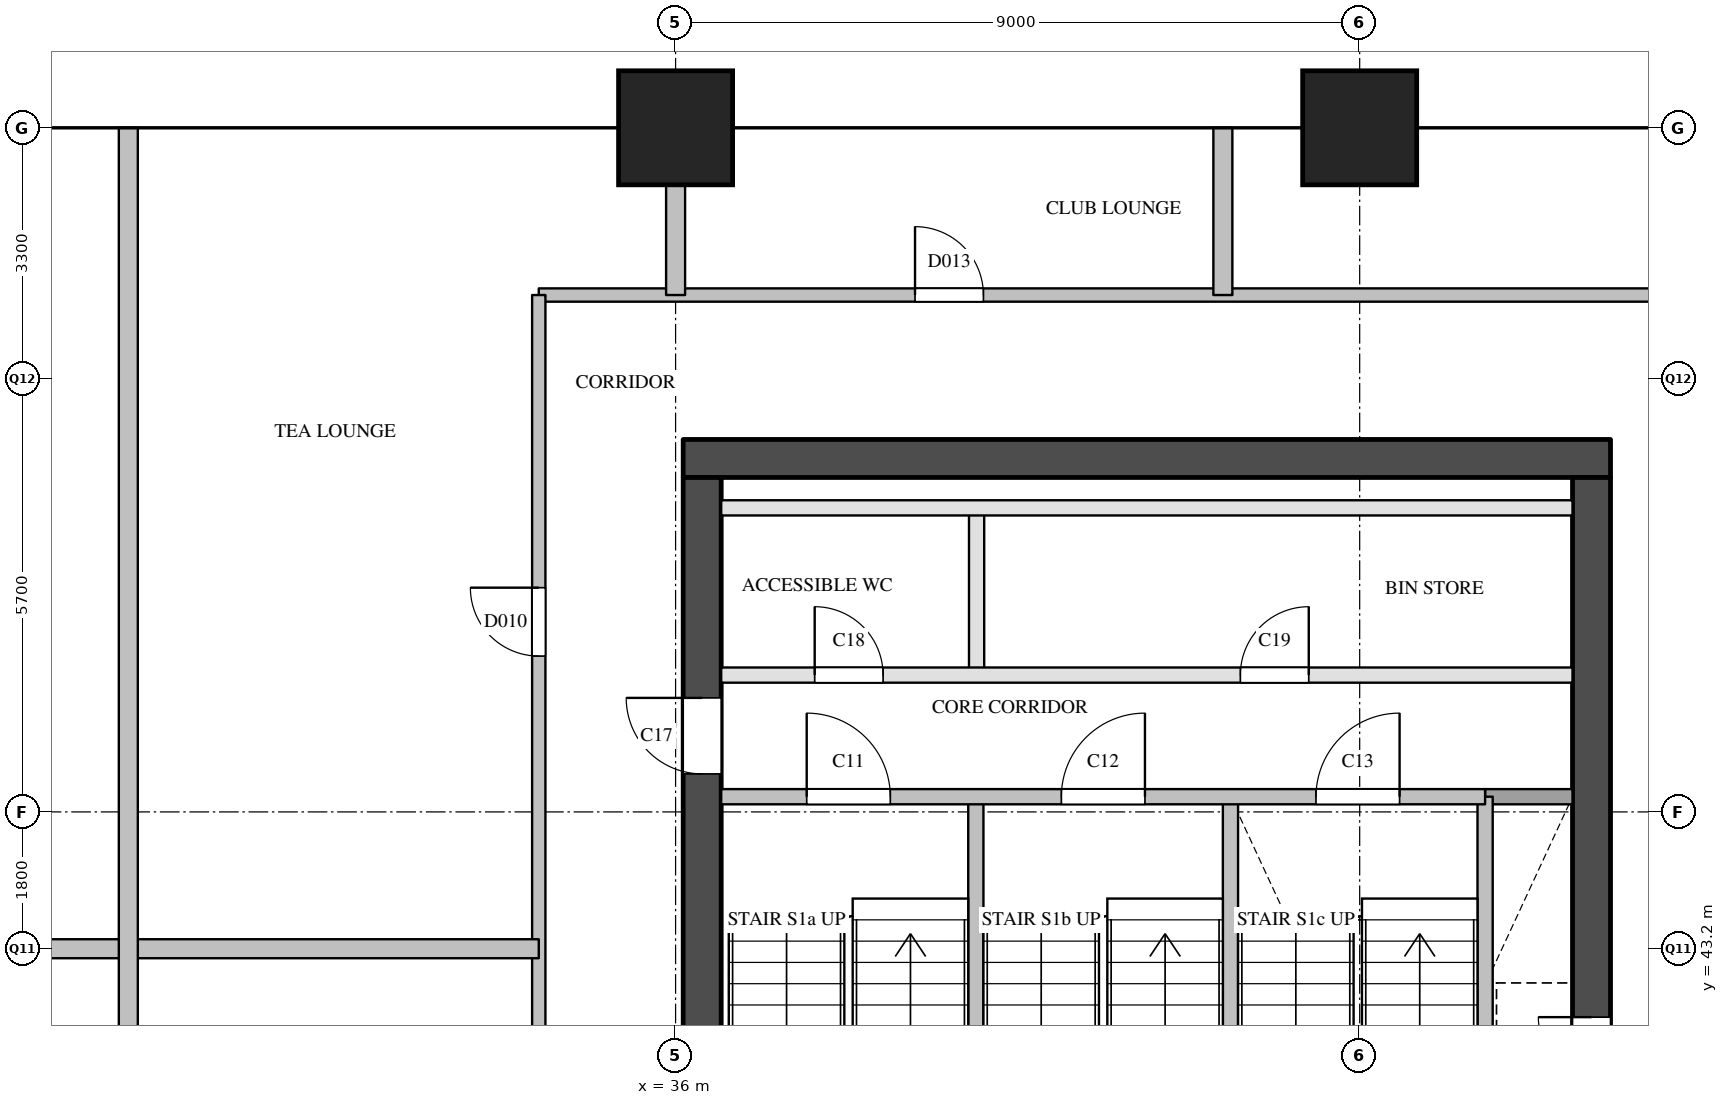
"""IFC4 building model, lengths in metres.
Left out: names, types, materials, properties, quantities, classifications, styles, units other than length and angle.
Written with IfcOpenShell. Run it as: python <this file> out.ifc"""

import sys

from ifc_helpers import new_model, si_unit, direction, frame, frame_2d, origin, origin_2d, place, context, subcontext, project, spatial, rectangle, extrude, element, fill, save


model = new_model("IFC4")
c1 = context("Model", 3, precision=1e-05, world=origin(), true_north=direction((0.0, 1.0)))
c2 = subcontext(c1, "Body", "Model", "MODEL_VIEW")
j1 = project(units=[si_unit("LENGTHUNIT", "METRE"), si_unit("PLANEANGLEUNIT", "RADIAN")], contexts=[c1])
p1 = place(None, origin())
s1 = spatial("IfcSite", under=j1, at=p1, CompositionType="ELEMENT")
p2 = place(p1, origin())
s2 = spatial("IfcBuilding", under=s1, at=p2, CompositionType="ELEMENT")
p3 = place(p2, frame((0.0, 0.0, 185.6)))
s3 = spatial("IfcBuildingStorey", under=s2, at=p3, CompositionType="ELEMENT", Elevation=185.6)
for number, where, z_axis, x_axis in (
    (1, (36.0, 54.0, 0.0), (0.0, 0.0, 1.0), (1.0, 0.0, 0.0)),
    (2, (45.0, 54.0, 0.0), (0.0, 0.0, 1.0), (1.0, 0.0, 0.0)),
):
    element("IfcColumn", number, at=place(p3, frame(where, z_axis=z_axis, x_axis=x_axis)), inside=s3, PredefinedType="COLUMN", context=c2, shape_type="SweptSolid", body=[
        extrude(rectangle(XDim=1.5, YDim=1.5, at=origin_2d()), origin(), (0.0, 0.0, 1.0), 3.9),
    ])
p4 = place(p3, frame((36.1, 49.65, 0.0), z_axis=(0.0, 0.0, 1.0), x_axis=(1.0, 0.0, 0.0)))
e3 = element("IfcWall", 3, at=p4, inside=s3, PredefinedType="SHEAR", context=c2, shape_type="SweptSolid", body=[
    extrude(rectangle(XDim=12.2, YDim=0.5, at=frame_2d((6.1, 0.0))), origin(), (0.0, 0.0, 1.0), 3.6),
])
p5 = place(p3, frame((36.35, 29.1, 0.0), z_axis=(0.0, 0.0, 1.0), x_axis=(0.0, 1.0, 0.0)))
e4 = element("IfcWall", 4, at=p5, inside=s3, PredefinedType="SHEAR", context=c2, shape_type="SweptSolid", body=[
    extrude(rectangle(XDim=20.3, YDim=0.5, at=frame_2d((10.15, 0.0))), origin(), (0.0, 0.0, 1.0), 3.6),
])
p6 = place(p5, frame((3.6, 0.0, 0.0)))
e5 = element("IfcOpeningElement", 5, at=p6, cuts=e4, PredefinedType="OPENING", context=c2, shape_type="SweptSolid", body=[
    extrude(rectangle(XDim=1.8, YDim=2.1, at=frame_2d((0.9, 1.05))), frame((0.0, 0.26, 0.0), z_axis=(0.0, -1.0, 0.0), x_axis=(1.0, 0.0, 0.0)), (0.0, 0.0, 1.0), 0.52),
])
p7 = place(p5, frame((16.4, 0.0, 0.0)))
e6 = element("IfcOpeningElement", 6, at=p7, cuts=e4, PredefinedType="OPENING", context=c2, shape_type="SweptSolid", body=[
    extrude(rectangle(XDim=1.0, YDim=2.1, at=frame_2d((0.5, 1.05))), frame((0.0, 0.26, 0.0), z_axis=(0.0, -1.0, 0.0), x_axis=(1.0, 0.0, 0.0)), (0.0, 0.0, 1.0), 0.52),
])
p8 = place(p3, frame((48.05, 29.1, 0.0), z_axis=(0.0, 0.0, 1.0), x_axis=(0.0, 1.0, 0.0)))
e7 = element("IfcWall", 7, at=p8, inside=s3, PredefinedType="SHEAR", context=c2, shape_type="SweptSolid", body=[
    extrude(rectangle(XDim=20.3, YDim=0.5, at=frame_2d((10.15, 0.0))), origin(), (0.0, 0.0, 1.0), 3.6),
])
p9 = place(p8, frame((12.5, 0.0, 0.0)))
e8 = element("IfcOpeningElement", 8, at=p9, cuts=e7, PredefinedType="OPENING", context=c2, shape_type="SweptSolid", body=[
    extrude(rectangle(XDim=0.7, YDim=2.1, at=frame_2d((0.35, 1.05))), frame((0.0, 0.26, 0.0), z_axis=(0.0, -1.0, 0.0), x_axis=(1.0, 0.0, 0.0)), (0.0, 0.0, 1.0), 0.52),
])
p10 = place(p8, frame((3.9, 0.0, 0.0)))
e9 = element("IfcOpeningElement", 9, at=p10, cuts=e7, PredefinedType="OPENING", context=c2, shape_type="SweptSolid", body=[
    extrude(rectangle(XDim=1.8, YDim=2.1, at=frame_2d((0.9, 1.05))), frame((0.0, 0.26, 0.0), z_axis=(0.0, -1.0, 0.0), x_axis=(1.0, 0.0, 0.0)), (0.0, 0.0, 1.0), 0.52),
])
p11 = place(p3, frame((39.95, 40.78, 0.0), z_axis=(0.0, 0.0, 1.0), x_axis=(0.0, 1.0, 0.0)))
e10 = element("IfcWall", 10, at=p11, inside=s3, PredefinedType="SOLIDWALL", context=c2, shape_type="SweptSolid", body=[
    extrude(rectangle(XDim=4.42, YDim=0.2, at=frame_2d((2.21, 0.0))), origin(), (0.0, 0.0, 1.0), 3.6),
])
p12 = place(p3, frame((39.96, 46.8, 0.0), z_axis=(0.0, 0.0, 1.0), x_axis=(0.0, 1.0, 0.0)))
e11 = element("IfcWall", 11, at=p12, inside=s3, PredefinedType="PARTITIONING", context=c2, shape_type="SweptSolid", body=[
    extrude(rectangle(XDim=2.2, YDim=0.2, at=frame_2d((1.1, 0.0))), origin(), (0.0, 0.0, 1.0), 3.6),
])
for number, where, z_axis, x_axis in (
    (12, (43.3, 40.78, 0.0), (0.0, 0.0, 1.0), (0.0, 1.0, 0.0)),
    (13, (46.65, 40.78, 0.0), (0.0, 0.0, 1.0), (0.0, 1.0, 0.0)),
):
    element("IfcWall", number, at=place(p3, frame(where, z_axis=z_axis, x_axis=x_axis)), inside=s3, PredefinedType="SOLIDWALL", context=c2, shape_type="SweptSolid", body=[
        extrude(rectangle(XDim=4.42, YDim=0.2, at=frame_2d((2.21, 0.0))), origin(), (0.0, 0.0, 1.0), 3.6),
    ])
p13 = place(p3, frame((46.65, 45.2, 0.0), z_axis=(0.0, 0.0, 1.0), x_axis=(1.0, 0.0, 0.0)))
e14 = element("IfcWall", 14, at=p13, inside=s3, PredefinedType="SOLIDWALL", context=c2, shape_type="SweptSolid", body=[
    extrude(rectangle(XDim=1.15, YDim=0.2, at=frame_2d((0.575, 0.0))), origin(), (0.0, 0.0, 1.0), 3.6),
])
p14 = place(p3, frame((36.6, 45.2, 0.0), z_axis=(0.0, 0.0, 1.0), x_axis=(1.0, 0.0, 0.0)))
e15 = element("IfcWall", 15, at=p14, inside=s3, PredefinedType="SOLIDWALL", context=c2, shape_type="SweptSolid", body=[
    extrude(rectangle(XDim=10.05, YDim=0.2, at=frame_2d((5.025, 0.0))), origin(), (0.0, 0.0, 1.0), 3.6),
])
p15 = place(p14, frame((1.125, 0.0, 0.0)))
e16 = element("IfcOpeningElement", 16, at=p15, cuts=e15, PredefinedType="OPENING", context=c2, shape_type="SweptSolid", body=[
    extrude(rectangle(XDim=1.1, YDim=2.1, at=frame_2d((0.55, 1.05))), frame((0.0, 0.11, 0.0), z_axis=(0.0, -1.0, 0.0), x_axis=(1.0, 0.0, 0.0)), (0.0, 0.0, 1.0), 0.22),
])
p16 = place(p14, frame((4.475, 0.0, 0.0)))
e17 = element("IfcOpeningElement", 17, at=p16, cuts=e15, PredefinedType="OPENING", context=c2, shape_type="SweptSolid", body=[
    extrude(rectangle(XDim=1.1, YDim=2.1, at=frame_2d((0.55, 1.05))), frame((0.0, 0.11, 0.0), z_axis=(0.0, -1.0, 0.0), x_axis=(1.0, 0.0, 0.0)), (0.0, 0.0, 1.0), 0.22),
])
p17 = place(p14, frame((7.825, 0.0, 0.0)))
e18 = element("IfcOpeningElement", 18, at=p17, cuts=e15, PredefinedType="OPENING", context=c2, shape_type="SweptSolid", body=[
    extrude(rectangle(XDim=1.1, YDim=2.1, at=frame_2d((0.55, 1.05))), frame((0.0, 0.11, 0.0), z_axis=(0.0, -1.0, 0.0), x_axis=(1.0, 0.0, 0.0)), (0.0, 0.0, 1.0), 0.22),
])
p18 = place(p3, frame((36.6, 46.8, 0.0), z_axis=(0.0, 0.0, 1.0), x_axis=(1.0, 0.0, 0.0)))
e19 = element("IfcWall", 19, at=p18, inside=s3, PredefinedType="PARTITIONING", context=c2, shape_type="SweptSolid", body=[
    extrude(rectangle(XDim=11.2, YDim=0.2, at=frame_2d((5.6, 0.0))), origin(), (0.0, 0.0, 1.0), 3.6),
])
p19 = place(p18, frame((1.23, 0.0, 0.0)))
e20 = element("IfcOpeningElement", 20, at=p19, cuts=e19, PredefinedType="OPENING", context=c2, shape_type="SweptSolid", body=[
    extrude(rectangle(XDim=0.9, YDim=2.1, at=frame_2d((0.45, 1.05))), frame((0.0, 0.11, 0.0), z_axis=(0.0, -1.0, 0.0), x_axis=(1.0, 0.0, 0.0)), (0.0, 0.0, 1.0), 0.22),
])
p20 = place(p18, frame((6.83, 0.0, 0.0)))
e21 = element("IfcOpeningElement", 21, at=p20, cuts=e19, PredefinedType="OPENING", context=c2, shape_type="SweptSolid", body=[
    extrude(rectangle(XDim=0.9, YDim=2.1, at=frame_2d((0.45, 1.05))), frame((0.0, 0.11, 0.0), z_axis=(0.0, -1.0, 0.0), x_axis=(1.0, 0.0, 0.0)), (0.0, 0.0, 1.0), 0.22),
])
p21 = place(p3, frame((36.6, 49.0, 0.0), z_axis=(0.0, 0.0, 1.0), x_axis=(1.0, 0.0, 0.0)))
e22 = element("IfcWall", 22, at=p21, inside=s3, PredefinedType="PARTITIONING", context=c2, shape_type="SweptSolid", body=[
    extrude(rectangle(XDim=11.2, YDim=0.2, at=frame_2d((5.6, 0.0))), origin(), (0.0, 0.0, 1.0), 3.6),
])
p22 = place(p3, frame((34.2, 51.8, 0.0), z_axis=(0.0, 0.0, 1.0), x_axis=(1.0, 0.0, 0.0)))
e23 = element("IfcWall", 23, at=p22, inside=s3, PredefinedType="PARTITIONING", context=c2, shape_type="SweptSolid", body=[
    extrude(rectangle(XDim=16.0, YDim=0.175, at=frame_2d((8.0, 0.0))), origin(), (0.0, 0.0, 1.0), 3.6),
])
p23 = place(p22, frame((4.95, 0.0, 0.0)))
e24 = element("IfcOpeningElement", 24, at=p23, cuts=e23, PredefinedType="OPENING", context=c2, shape_type="SweptSolid", body=[
    extrude(rectangle(XDim=0.9, YDim=2.1, at=frame_2d((0.45, 1.05))), frame((0.0, 0.097, 0.0), z_axis=(0.0, -1.0, 0.0), x_axis=(1.0, 0.0, 0.0)), (0.0, 0.0, 1.0), 0.195),
])
p24 = place(p3, frame((34.2, 28.5, 0.0), z_axis=(0.0, 0.0, 1.0), x_axis=(0.0, 1.0, 0.0)))
e25 = element("IfcWall", 25, at=p24, inside=s3, PredefinedType="PARTITIONING", context=c2, shape_type="SweptSolid", body=[
    extrude(rectangle(XDim=23.3, YDim=0.175, at=frame_2d((11.65, 0.0))), origin(), (0.0, 0.0, 1.0), 3.6),
])
p25 = place(p24, frame((3.3, 0.0, 0.0)))
e26 = element("IfcOpeningElement", 26, at=p25, cuts=e25, PredefinedType="OPENING", context=c2, shape_type="SweptSolid", body=[
    extrude(rectangle(XDim=0.9, YDim=2.1, at=frame_2d((0.45, 1.05))), frame((0.0, 0.097, 0.0), z_axis=(0.0, -1.0, 0.0), x_axis=(1.0, 0.0, 0.0)), (0.0, 0.0, 1.0), 0.195),
])
p26 = place(p24, frame((10.6, 0.0, 0.0)))
e27 = element("IfcOpeningElement", 27, at=p26, cuts=e25, PredefinedType="OPENING", context=c2, shape_type="SweptSolid", body=[
    extrude(rectangle(XDim=1.0, YDim=2.1, at=frame_2d((0.5, 1.05))), frame((0.0, 0.097, 0.0), z_axis=(0.0, -1.0, 0.0), x_axis=(1.0, 0.0, 0.0)), (0.0, 0.0, 1.0), 0.195),
])
p27 = place(p24, frame((18.55, 0.0, 0.0)))
e28 = element("IfcOpeningElement", 28, at=p27, cuts=e25, PredefinedType="OPENING", context=c2, shape_type="SweptSolid", body=[
    extrude(rectangle(XDim=0.9, YDim=2.1, at=frame_2d((0.45, 1.05))), frame((0.0, 0.097, 0.0), z_axis=(0.0, -1.0, 0.0), x_axis=(1.0, 0.0, 0.0)), (0.0, 0.0, 1.0), 0.195),
])
p28 = place(p3, frame((19.8, 43.2, 0.0), z_axis=(0.0, 0.0, 1.0), x_axis=(1.0, 0.0, 0.0)))
e29 = element("IfcWall", 29, at=p28, inside=s3, PredefinedType="PARTITIONING", context=c2, shape_type="SweptSolid", body=[
    extrude(rectangle(XDim=14.4, YDim=0.25, at=frame_2d((7.2, 0.0))), origin(), (0.0, 0.0, 1.0), 2.6),
])
p29 = place(p3, frame((28.8, 36.0, 0.0), z_axis=(0.0, 0.0, 1.0), x_axis=(0.0, 1.0, 0.0)))
e30 = element("IfcWall", 30, at=p29, inside=s3, PredefinedType="PARTITIONING", context=c2, shape_type="SweptSolid", body=[
    extrude(rectangle(XDim=18.0, YDim=0.25, at=frame_2d((9.0, 0.0))), origin(), (0.0, 0.0, 1.0), 2.6),
])
p30 = place(p3, frame((36.0, 51.8, 0.0), z_axis=(0.0, 0.0, 1.0), x_axis=(0.0, 1.0, 0.0)))
e31 = element("IfcWall", 31, at=p30, inside=s3, PredefinedType="PARTITIONING", context=c2, shape_type="SweptSolid", body=[
    extrude(rectangle(XDim=2.2, YDim=0.25, at=frame_2d((1.1, 0.0))), origin(), (0.0, 0.0, 1.0), 3.6),
])
p31 = place(p3, frame((43.2, 51.8, 0.0), z_axis=(0.0, 0.0, 1.0), x_axis=(0.0, 1.0, 0.0)))
e32 = element("IfcWall", 32, at=p31, inside=s3, PredefinedType="PARTITIONING", context=c2, shape_type="SweptSolid", body=[
    extrude(rectangle(XDim=2.2, YDim=0.25, at=frame_2d((1.1, 0.0))), origin(), (0.0, 0.0, 1.0), 2.6),
])
p32 = place(p15, origin())
e33 = element("IfcDoor", 33, at=p32, inside=s3, OperationType="SINGLE_SWING_LEFT", PredefinedType="DOOR", context=c2, shape_type="SweptSolid", body=[
    extrude(rectangle(XDim=1.1, YDim=2.1, at=frame_2d((0.55, 1.05))), frame((0.0, 0.025, 0.0), z_axis=(0.0, -1.0, 0.0), x_axis=(1.0, 0.0, 0.0)), (0.0, 0.0, 1.0), 0.05),
])
fill(e16, e33)
p33 = place(p16, origin())
e34 = element("IfcDoor", 34, at=p33, inside=s3, OperationType="SINGLE_SWING_RIGHT", PredefinedType="DOOR", context=c2, shape_type="SweptSolid", body=[
    extrude(rectangle(XDim=1.1, YDim=2.1, at=frame_2d((0.55, 1.05))), frame((0.0, 0.025, 0.0), z_axis=(0.0, -1.0, 0.0), x_axis=(1.0, 0.0, 0.0)), (0.0, 0.0, 1.0), 0.05),
])
fill(e17, e34)
p34 = place(p17, origin())
e35 = element("IfcDoor", 35, at=p34, inside=s3, OperationType="SINGLE_SWING_RIGHT", PredefinedType="DOOR", context=c2, shape_type="SweptSolid", body=[
    extrude(rectangle(XDim=1.1, YDim=2.1, at=frame_2d((0.55, 1.05))), frame((0.0, 0.025, 0.0), z_axis=(0.0, -1.0, 0.0), x_axis=(1.0, 0.0, 0.0)), (0.0, 0.0, 1.0), 0.05),
])
fill(e18, e35)
p35 = place(p9, origin())
e36 = element("IfcDoor", 36, at=p35, inside=s3, OperationType="SINGLE_SWING_RIGHT", PredefinedType="DOOR", context=c2, shape_type="SweptSolid", body=[
    extrude(rectangle(XDim=0.7, YDim=2.1, at=frame_2d((0.35, 1.05))), frame((0.0, 0.025, 0.0), z_axis=(0.0, -1.0, 0.0), x_axis=(1.0, 0.0, 0.0)), (0.0, 0.0, 1.0), 0.05),
])
fill(e8, e36)
p36 = place(p7, origin())
e37 = element("IfcDoor", 37, at=p36, inside=s3, OperationType="SINGLE_SWING_RIGHT", PredefinedType="DOOR", context=c2, shape_type="SweptSolid", body=[
    extrude(rectangle(XDim=1.0, YDim=2.1, at=frame_2d((0.5, 1.05))), frame((0.0, 0.025, 0.0), z_axis=(0.0, -1.0, 0.0), x_axis=(1.0, 0.0, 0.0)), (0.0, 0.0, 1.0), 0.05),
])
fill(e6, e37)
p37 = place(p19, origin())
e38 = element("IfcDoor", 38, at=p37, inside=s3, OperationType="SINGLE_SWING_LEFT", PredefinedType="DOOR", context=c2, shape_type="SweptSolid", body=[
    extrude(rectangle(XDim=0.9, YDim=2.1, at=frame_2d((0.45, 1.05))), frame((0.0, 0.025, 0.0), z_axis=(0.0, -1.0, 0.0), x_axis=(1.0, 0.0, 0.0)), (0.0, 0.0, 1.0), 0.05),
])
fill(e20, e38)
p38 = place(p20, origin())
e39 = element("IfcDoor", 39, at=p38, inside=s3, OperationType="SINGLE_SWING_RIGHT", PredefinedType="DOOR", context=c2, shape_type="SweptSolid", body=[
    extrude(rectangle(XDim=0.9, YDim=2.1, at=frame_2d((0.45, 1.05))), frame((0.0, 0.025, 0.0), z_axis=(0.0, -1.0, 0.0), x_axis=(1.0, 0.0, 0.0)), (0.0, 0.0, 1.0), 0.05),
])
fill(e21, e39)
p39 = place(p27, origin())
e40 = element("IfcDoor", 40, at=p39, inside=s3, OperationType="SINGLE_SWING_RIGHT", PredefinedType="DOOR", context=c2, shape_type="SweptSolid", body=[
    extrude(rectangle(XDim=0.9, YDim=2.1, at=frame_2d((0.45, 1.05))), frame((0.0, 0.025, 0.0), z_axis=(0.0, -1.0, 0.0), x_axis=(1.0, 0.0, 0.0)), (0.0, 0.0, 1.0), 0.05),
])
fill(e28, e40)
p40 = place(p23, origin())
e41 = element("IfcDoor", 41, at=p40, inside=s3, OperationType="SINGLE_SWING_LEFT", PredefinedType="DOOR", context=c2, shape_type="SweptSolid", body=[
    extrude(rectangle(XDim=0.9, YDim=2.1, at=frame_2d((0.45, 1.05))), frame((0.0, 0.025, 0.0), z_axis=(0.0, -1.0, 0.0), x_axis=(1.0, 0.0, 0.0)), (0.0, 0.0, 1.0), 0.05),
])
fill(e24, e41)
save(model, sys.argv[1])
